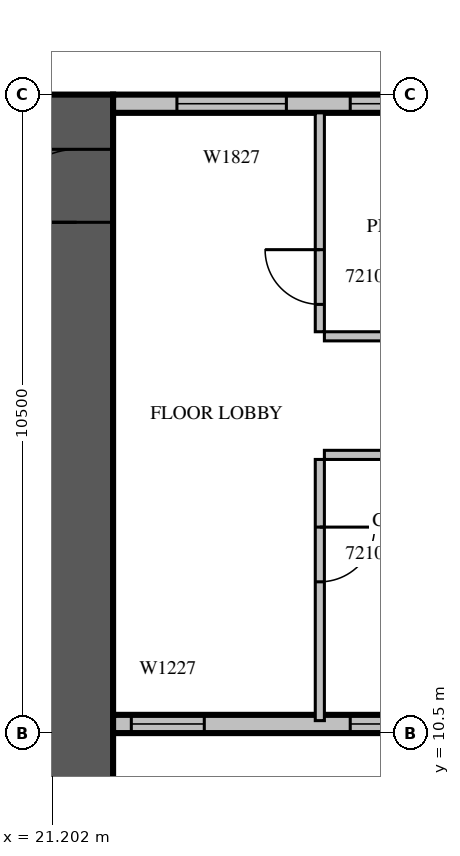
"""IFC4 building model, lengths in metres.
Left out: names, types, materials, properties, quantities, classifications, styles, units other than length and angle.
Written with IfcOpenShell. Run it as: python <this file> out.ifc"""

import sys

from ifc_helpers import new_model, si_unit, direction, frame, frame_2d, origin, place, context, subcontext, project, spatial, rectangle, extrude, source, transform, mapped, element, fill, save


model = new_model("IFC4")
c1 = context("Model", 3, precision=1e-05, world=origin(), true_north=direction((0.0, 1.0)))
c2 = subcontext(c1, "Body", "Model", "MODEL_VIEW")
j1 = project(units=[si_unit("LENGTHUNIT", "METRE"), si_unit("PLANEANGLEUNIT", "RADIAN")], contexts=[c1])
p1 = place(None, origin())
s1 = spatial("IfcSite", under=j1, at=p1, CompositionType="ELEMENT")
p2 = place(p1, origin())
s2 = spatial("IfcBuilding", under=s1, at=p2, CompositionType="ELEMENT")
p3 = place(p2, frame((0.0, 0.0, 99.3)))
s3 = spatial("IfcBuildingStorey", under=s2, at=p3, CompositionType="ELEMENT", Elevation=99.3)
m1 = source(origin(), c2, "Body", "SweptSolid", [
    extrude(rectangle(XDim=16.8, YDim=1.2, at=frame_2d((8.4, 0.0))), origin(), (0.0, 0.0, 1.0), 4.2),
])
p4 = place(p3, frame((21.6, 4.2, 0.0), z_axis=(0.0, 0.0, 1.0), x_axis=(0.0, 1.0, 0.0)))
e1 = element("IfcWall", 1, at=p4, inside=s3, PredefinedType="SHEAR", context=c2, shape_type="MappedRepresentation", body=[
    mapped(m1, transform((0.0, 0.0, 0.0), scale=1.0)),
])
m2 = source(origin(), c2, "Body", "SweptSolid", [
    extrude(rectangle(XDim=1.2, YDim=2.1, at=frame_2d((0.6, 1.05))), frame((0.0, 0.61, 0.0), z_axis=(0.0, -1.0, 0.0), x_axis=(1.0, 0.0, 0.0)), (0.0, 0.0, 1.0), 1.22),
])
p5 = place(p4, frame((14.7, 0.0, 0.0)))
e2 = element("IfcOpeningElement", 2, at=p5, cuts=e1, PredefinedType="OPENING", context=c2, shape_type="MappedRepresentation", body=[
    mapped(m2, transform((0.0, 0.0, 0.0), scale=1.0)),
])
m3 = source(origin(), c2, "Body", "SweptSolid", [
    extrude(rectangle(XDim=6.6, YDim=0.3, at=frame_2d((3.3, 0.0))), origin(), (0.0, 0.0, 1.0), 3.8),
])
p6 = place(p3, frame((22.2, 10.65, 0.0), z_axis=(0.0, 0.0, 1.0), x_axis=(1.0, 0.0, 0.0)))
e3 = element("IfcWall", 3, at=p6, inside=s3, PredefinedType="STANDARD", context=c2, shape_type="MappedRepresentation", body=[
    mapped(m3, transform((0.0, 0.0, 0.0), scale=1.0)),
])
m4 = source(origin(), c2, "Body", "SweptSolid", [
    extrude(rectangle(XDim=1.2, YDim=2.7, at=frame_2d((0.6, 1.35))), frame((0.0, 0.16, 0.0), z_axis=(0.0, -1.0, 0.0), x_axis=(1.0, 0.0, 0.0)), (0.0, 0.0, 1.0), 0.32),
])
p7 = place(p6, frame((0.3, 0.0, 0.6)))
e4 = element("IfcOpeningElement", 4, at=p7, cuts=e3, PredefinedType="OPENING", context=c2, shape_type="MappedRepresentation", body=[
    mapped(m4, transform((0.0, 0.0, 0.0), scale=1.0)),
])
m5 = source(origin(), c2, "Body", "SweptSolid", [
    extrude(rectangle(XDim=2.4, YDim=2.7, at=frame_2d((1.2, 1.35))), frame((0.0, 0.16, 0.0), z_axis=(0.0, -1.0, 0.0), x_axis=(1.0, 0.0, 0.0)), (0.0, 0.0, 1.0), 0.32),
])
p8 = place(p6, frame((3.9, 0.0, 0.6)))
e5 = element("IfcOpeningElement", 5, at=p8, cuts=e3, PredefinedType="OPENING", context=c2, shape_type="MappedRepresentation", body=[
    mapped(m5, transform((0.0, 0.0, 0.0), scale=1.0)),
])
p9 = place(p3, frame((28.8, 20.85, 0.0), z_axis=(0.0, 0.0, 1.0), x_axis=(-1.0, 0.0, 0.0)))
e6 = element("IfcWall", 6, at=p9, inside=s3, PredefinedType="STANDARD", context=c2, shape_type="MappedRepresentation", body=[
    mapped(m3, transform((0.0, 0.0, 0.0), scale=1.0)),
])
p10 = place(p9, frame((0.3, 0.0, 0.6)))
e7 = element("IfcOpeningElement", 7, at=p10, cuts=e6, PredefinedType="OPENING", context=c2, shape_type="MappedRepresentation", body=[
    mapped(m5, transform((0.0, 0.0, 0.0), scale=1.0)),
])
m6 = source(origin(), c2, "Body", "SweptSolid", [
    extrude(rectangle(XDim=1.8, YDim=2.7, at=frame_2d((0.9, 1.35))), frame((0.0, 0.16, 0.0), z_axis=(0.0, -1.0, 0.0), x_axis=(1.0, 0.0, 0.0)), (0.0, 0.0, 1.0), 0.32),
])
p11 = place(p9, frame((3.75, 0.0, 0.6)))
e8 = element("IfcOpeningElement", 8, at=p11, cuts=e6, PredefinedType="OPENING", context=c2, shape_type="MappedRepresentation", body=[
    mapped(m6, transform((0.0, 0.0, 0.0), scale=1.0)),
])
m7 = source(origin(), c2, "Body", "SweptSolid", [
    extrude(rectangle(XDim=4.295, YDim=0.15, at=frame_2d((2.147, 0.0))), origin(), (0.0, 0.0, 1.0), 3.8),
])
p12 = place(p3, frame((25.6, 15.0, 0.0), z_axis=(0.0, 0.0, 1.0), x_axis=(0.0, -1.0, 0.0)))
e9 = element("IfcWall", 9, at=p12, inside=s3, PredefinedType="PARTITIONING", context=c2, shape_type="MappedRepresentation", body=[
    mapped(m7, transform((0.0, 0.0, 0.0), scale=1.0)),
])
m8 = source(origin(), c2, "Body", "SweptSolid", [
    extrude(rectangle(XDim=0.9, YDim=2.1, at=frame_2d((0.45, 1.05))), frame((0.0, 0.085, 0.0), z_axis=(0.0, -1.0, 0.0), x_axis=(1.0, 0.0, 0.0)), (0.0, 0.0, 1.0), 0.17),
])
p13 = place(p12, frame((1.113, 0.0, 0.0)))
e10 = element("IfcOpeningElement", 10, at=p13, cuts=e9, PredefinedType="OPENING", context=c2, shape_type="MappedRepresentation", body=[
    mapped(m8, transform((0.0, 0.0, 0.0), scale=1.0)),
])
m9 = source(origin(), c2, "Body", "SweptSolid", [
    extrude(rectangle(XDim=3.6, YDim=0.15, at=frame_2d((1.8, 0.0))), origin(), (0.0, 0.0, 1.0), 3.8),
])
p14 = place(p3, frame((25.6, 20.7, 0.0), z_axis=(0.0, 0.0, 1.0), x_axis=(0.0, -1.0, 0.0)))
e11 = element("IfcWall", 11, at=p14, inside=s3, PredefinedType="PARTITIONING", context=c2, shape_type="MappedRepresentation", body=[
    mapped(m9, transform((0.0, 0.0, 0.0), scale=1.0)),
])
p15 = place(p14, frame((2.25, 0.0, 0.0)))
e12 = element("IfcOpeningElement", 12, at=p15, cuts=e11, PredefinedType="OPENING", context=c2, shape_type="MappedRepresentation", body=[
    mapped(m8, transform((0.0, 0.0, 0.0), scale=1.0)),
])
m10 = source(origin(), c2, "Body", "SweptSolid", [
    extrude(rectangle(XDim=3.65, YDim=0.15, at=frame_2d((1.825, 0.0))), origin(), (0.0, 0.0, 1.0), 3.8),
])
for number, where, z_axis, x_axis in (
    (13, (29.325, 15.075, 0.0), (0.0, 0.0, 1.0), (-1.0, 0.0, 0.0)),
    (14, (25.675, 17.025, 0.0), (0.0, 0.0, 1.0), (1.0, 0.0, 0.0)),
):
    element("IfcWall", number, at=place(p3, frame(where, z_axis=z_axis, x_axis=x_axis)), inside=s3, PredefinedType="PARTITIONING", context=c2, shape_type="MappedRepresentation", body=[
        mapped(m10, transform((0.0, 0.0, 0.0), scale=1.0)),
    ])
m11 = source(origin(), c2, "Body", "SweptSolid", [
    extrude(rectangle(XDim=1.2, YDim=2.7, at=frame_2d((0.6, 1.35))), frame((0.0, 0.03, 0.0), z_axis=(0.0, -1.0, 0.0), x_axis=(1.0, 0.0, 0.0)), (0.0, 0.0, 1.0), 0.06),
])
p16 = place(p7, origin())
e15 = element("IfcWindow", 15, at=p16, inside=s3, PartitioningType="SINGLE_PANEL", PredefinedType="WINDOW", context=c2, shape_type="MappedRepresentation", body=[
    mapped(m11, transform((0.0, 0.0, 0.0), scale=1.0)),
])
fill(e4, e15)
m12 = source(origin(), c2, "Body", "SweptSolid", [
    extrude(rectangle(XDim=2.4, YDim=2.7, at=frame_2d((1.2, 1.35))), frame((0.0, 0.03, 0.0), z_axis=(0.0, -1.0, 0.0), x_axis=(1.0, 0.0, 0.0)), (0.0, 0.0, 1.0), 0.06),
])
p17 = place(p8, origin())
e16 = element("IfcWindow", 16, at=p17, inside=s3, PartitioningType="SINGLE_PANEL", PredefinedType="WINDOW", context=c2, shape_type="MappedRepresentation", body=[
    mapped(m12, transform((0.0, 0.0, 0.0), scale=1.0)),
])
fill(e5, e16)
p18 = place(p10, origin())
e17 = element("IfcWindow", 17, at=p18, inside=s3, PartitioningType="SINGLE_PANEL", PredefinedType="WINDOW", context=c2, shape_type="MappedRepresentation", body=[
    mapped(m12, transform((0.0, 0.0, 0.0), scale=1.0)),
])
fill(e7, e17)
m13 = source(origin(), c2, "Body", "SweptSolid", [
    extrude(rectangle(XDim=1.8, YDim=2.7, at=frame_2d((0.9, 1.35))), frame((0.0, 0.03, 0.0), z_axis=(0.0, -1.0, 0.0), x_axis=(1.0, 0.0, 0.0)), (0.0, 0.0, 1.0), 0.06),
])
p19 = place(p11, origin())
e18 = element("IfcWindow", 18, at=p19, inside=s3, PartitioningType="SINGLE_PANEL", PredefinedType="WINDOW", context=c2, shape_type="MappedRepresentation", body=[
    mapped(m13, transform((0.0, 0.0, 0.0), scale=1.0)),
])
fill(e8, e18)
m14 = source(origin(), c2, "Body", "SweptSolid", [
    extrude(rectangle(XDim=1.2, YDim=2.1, at=frame_2d((0.6, 1.05))), frame((0.0, 0.025, 0.0), z_axis=(0.0, -1.0, 0.0), x_axis=(1.0, 0.0, 0.0)), (0.0, 0.0, 1.0), 0.05),
])
p20 = place(p5, origin())
e19 = element("IfcDoor", 19, at=p20, inside=s3, OperationType="SINGLE_SWING_LEFT", PredefinedType="DOOR", context=c2, shape_type="MappedRepresentation", body=[
    mapped(m14, transform((0.0, 0.0, 0.0), scale=1.0)),
])
fill(e2, e19)
m15 = source(origin(), c2, "Body", "SweptSolid", [
    extrude(rectangle(XDim=0.9, YDim=2.1, at=frame_2d((0.45, 1.05))), frame((0.0, 0.025, 0.0), z_axis=(0.0, -1.0, 0.0), x_axis=(1.0, 0.0, 0.0)), (0.0, 0.0, 1.0), 0.05),
])
p21 = place(p13, origin())
e20 = element("IfcDoor", 20, at=p21, inside=s3, OperationType="SINGLE_SWING_LEFT", PredefinedType="DOOR", context=c2, shape_type="MappedRepresentation", body=[
    mapped(m15, transform((0.0, 0.0, 0.0), scale=1.0)),
])
fill(e10, e20)
p22 = place(p15, origin())
e21 = element("IfcDoor", 21, at=p22, inside=s3, OperationType="SINGLE_SWING_RIGHT", PredefinedType="DOOR", context=c2, shape_type="MappedRepresentation", body=[
    mapped(m15, transform((0.0, 0.0, 0.0), scale=1.0)),
])
fill(e12, e21)
save(model, sys.argv[1])
